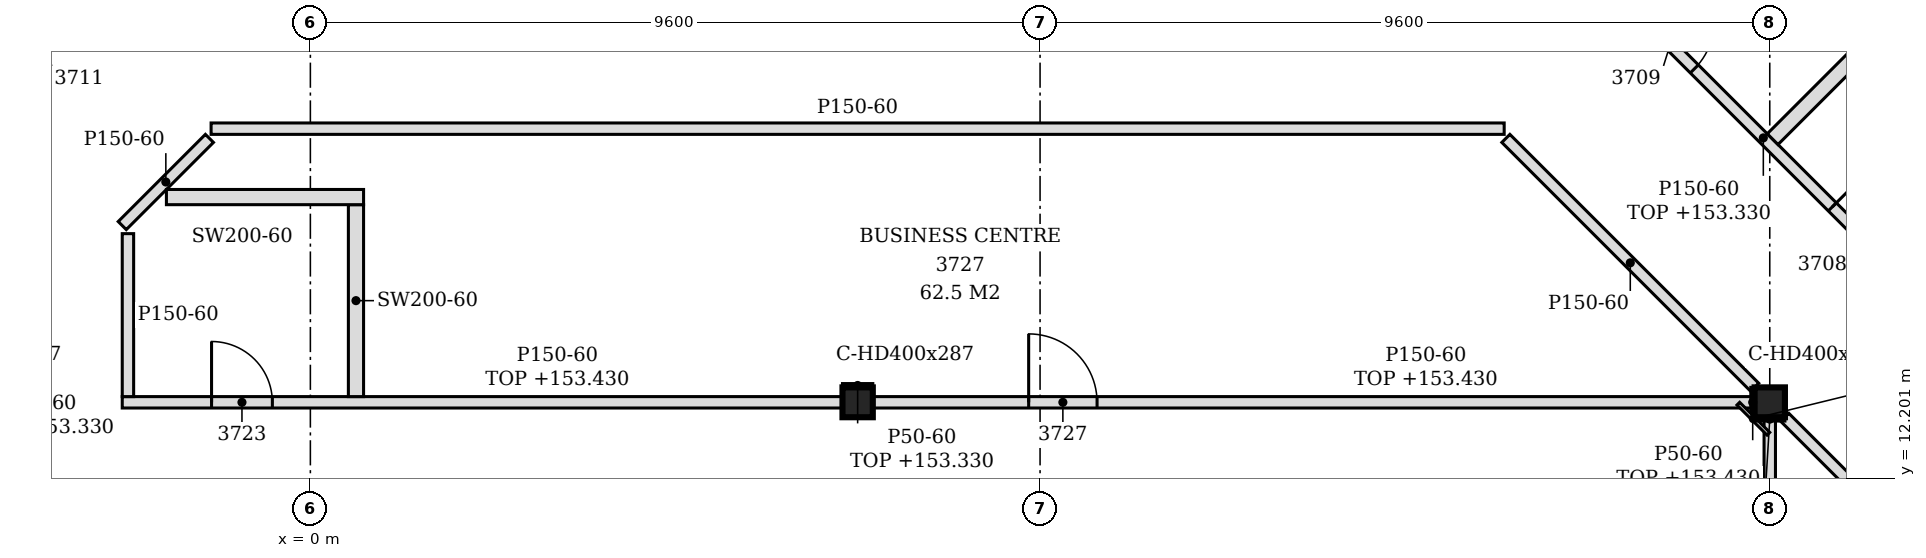
"""IFC4 building model, lengths in metres.
Left out: names, types, materials, properties, quantities, classifications, styles, units other than length and angle.
Written with IfcOpenShell. Run it as: python <this file> out.ifc"""

import sys

from ifc_helpers import new_model, si_unit, direction, frame, frame_2d, origin, origin_2d, place, context, subcontext, project, spatial, polyline, rectangle, i_section, outline, extrude, element, fill, save


model = new_model("IFC4")
c1 = context("Model", 3, precision=1e-05, world=origin(), true_north=direction((0.0, 1.0)))
c2 = subcontext(c1, "Body", "Model", "MODEL_VIEW")
j1 = project(units=[si_unit("LENGTHUNIT", "METRE"), si_unit("PLANEANGLEUNIT", "RADIAN")], contexts=[c1])
p1 = place(None, origin())
s1 = spatial("IfcSite", under=j1, at=p1, CompositionType="ELEMENT")
p2 = place(p1, origin())
s2 = spatial("IfcBuilding", under=s1, at=p2, CompositionType="ELEMENT")
p3 = place(p2, frame((0.0, 0.0, 150.6)))
s3 = spatial("IfcBuildingStorey", under=s2, at=p3, CompositionType="ELEMENT", Elevation=150.6)
for number, where, z_axis, x_axis in (
    (1, (7.2, 13.2, -0.15), (0.0, 0.0, 1.0), (1.0, 0.0, 0.0)),
    (2, (19.2, 13.2, -0.15), (0.0, 0.0, 1.0), (1.0, 0.0, 0.0)),
):
    element("IfcColumn", number, at=place(p3, frame(where, z_axis=z_axis, x_axis=x_axis)), inside=s3, PredefinedType="COLUMN", context=c2, shape_type="SweptSolid", body=[
        extrude(i_section(OverallWidth=0.399, OverallDepth=0.393, WebThickness=0.023, FlangeThickness=0.037, FilletRadius=0.015, at=origin_2d()), origin(), (0.0, 0.0, 1.0), 3.6),
    ])
p4 = place(p3, frame((19.2, 2.596, 0.0), z_axis=(0.0, 0.0, 1.0), x_axis=(0.0, 1.0, 0.0)))
e3 = element("IfcWall", 3, at=p4, inside=s3, PredefinedType="PARTITIONING", context=c2, shape_type="SweptSolid", body=[
    extrude(rectangle(XDim=10.407, YDim=0.15, at=frame_2d((5.204, 0.0))), origin(), (0.0, 0.0, 1.0), 2.83),
])
p5 = place(p4, frame((2.954, 0.0, 0.0)))
e4 = element("IfcOpeningElement", 4, at=p5, cuts=e3, PredefinedType="OPENING", context=c2, shape_type="SweptSolid", body=[
    extrude(rectangle(XDim=0.9, YDim=2.1, at=frame_2d((0.45, 1.05))), frame((0.0, 0.085, 0.0), z_axis=(0.0, -1.0, 0.0), x_axis=(1.0, 0.0, 0.0)), (0.0, 0.0, 1.0), 0.17),
])
p6 = place(p3, frame((23.872, 8.528, 0.0), z_axis=(0.0, 0.0, 1.0), x_axis=(-0.707126073897, 0.70708748795, 0.0)))
e5 = element("IfcWall", 5, at=p6, inside=s3, PredefinedType="PARTITIONING", context=c2, shape_type="SweptSolid", body=[
    extrude(rectangle(XDim=6.327, YDim=0.15, at=frame_2d((3.164, 0.0))), origin(), (0.0, 0.0, 1.0), 2.88),
])
p7 = place(p3, frame((-12.075, 9.319, 0.0), z_axis=(0.0, 0.0, 1.0), x_axis=(0.707106781187, 0.707106781187, 0.0)))
e6 = element("IfcWall", 6, at=p7, inside=s3, PredefinedType="PARTITIONING", context=c2, shape_type="SweptSolid", body=[
    extrude(rectangle(XDim=13.793, YDim=0.15, at=frame_2d((6.896, 0.0))), origin(), (0.0, 0.0, 1.0), 2.73),
])
p8 = place(p7, frame((11.692, 0.0, 0.0)))
e7 = element("IfcOpeningElement", 7, at=p8, cuts=e6, PredefinedType="OPENING", context=c2, shape_type="SweptSolid", body=[
    extrude(rectangle(XDim=0.9, YDim=2.1, at=frame_2d((0.45, 1.05))), frame((0.0, 0.085, 0.0), z_axis=(0.0, -1.0, 0.0), x_axis=(1.0, 0.0, 0.0)), (0.0, 0.0, 1.0), 0.17),
])
p9 = place(p7, frame((7.376, 0.0, 0.0)))
e8 = element("IfcOpeningElement", 8, at=p9, cuts=e6, PredefinedType="OPENING", context=c2, shape_type="SweptSolid", body=[
    extrude(rectangle(XDim=0.9, YDim=2.1, at=frame_2d((0.45, 1.05))), frame((0.0, 0.085, 0.0), z_axis=(0.0, -1.0, 0.0), x_axis=(1.0, 0.0, 0.0)), (0.0, 0.0, 1.0), 0.17),
])
p10 = place(p7, frame((3.62, 0.0, 0.0)))
e9 = element("IfcOpeningElement", 9, at=p10, cuts=e6, PredefinedType="OPENING", context=c2, shape_type="SweptSolid", body=[
    extrude(rectangle(XDim=0.9, YDim=2.1, at=frame_2d((0.45, 1.05))), frame((0.0, 0.085, 0.0), z_axis=(0.0, -1.0, 0.0), x_axis=(1.0, 0.0, 0.0)), (0.0, 0.0, 1.0), 0.17),
])
p11 = place(p3, frame((26.272, 9.522, 0.0), z_axis=(0.0, 0.0, 1.0), x_axis=(-0.707097742657, 0.707115819601, 0.0)))
e10 = element("IfcWall", 10, at=p11, inside=s3, PredefinedType="PARTITIONING", context=c2, shape_type="SweptSolid", body=[
    extrude(rectangle(XDim=13.506, YDim=0.15, at=frame_2d((6.753, 0.0))), origin(), (0.0, 0.0, 1.0), 2.73),
])
p12 = place(p11, frame((1.398, 0.0, 0.0)))
e11 = element("IfcOpeningElement", 11, at=p12, cuts=e10, PredefinedType="OPENING", context=c2, shape_type="SweptSolid", body=[
    extrude(rectangle(XDim=0.9, YDim=2.1, at=frame_2d((0.45, 1.05))), frame((0.0, 0.085, 0.0), z_axis=(0.0, -1.0, 0.0), x_axis=(1.0, 0.0, 0.0)), (0.0, 0.0, 1.0), 0.17),
])
p13 = place(p11, frame((4.668, 0.0, 0.0)))
e12 = element("IfcOpeningElement", 12, at=p13, cuts=e10, PredefinedType="OPENING", context=c2, shape_type="SweptSolid", body=[
    extrude(rectangle(XDim=0.9, YDim=2.1, at=frame_2d((0.45, 1.05))), frame((0.0, 0.085, 0.0), z_axis=(0.0, -1.0, 0.0), x_axis=(1.0, 0.0, 0.0)), (0.0, 0.0, 1.0), 0.17),
])
p14 = place(p11, frame((7.938, 0.0, 0.0)))
e13 = element("IfcOpeningElement", 13, at=p14, cuts=e10, PredefinedType="OPENING", context=c2, shape_type="SweptSolid", body=[
    extrude(rectangle(XDim=0.9, YDim=2.1, at=frame_2d((0.45, 1.05))), frame((0.0, 0.085, 0.0), z_axis=(0.0, -1.0, 0.0), x_axis=(1.0, 0.0, 0.0)), (0.0, 0.0, 1.0), 0.17),
])
p15 = place(p11, frame((11.405, 0.0, 0.0)))
e14 = element("IfcOpeningElement", 14, at=p15, cuts=e10, PredefinedType="OPENING", context=c2, shape_type="SweptSolid", body=[
    extrude(rectangle(XDim=0.9, YDim=2.1, at=frame_2d((0.45, 1.05))), frame((0.0, 0.085, 0.0), z_axis=(0.0, -1.0, 0.0), x_axis=(1.0, 0.0, 0.0)), (0.0, 0.0, 1.0), 0.17),
])
p16 = place(p3, frame((-2.475, 13.2, 0.0), z_axis=(0.0, 0.0, 1.0), x_axis=(1.0, 0.0, 0.0)))
e15 = element("IfcWall", 15, at=p16, inside=s3, PredefinedType="PARTITIONING", context=c2, shape_type="SweptSolid", body=[
    extrude(rectangle(XDim=9.476, YDim=0.15, at=frame_2d((4.738, 0.0))), origin(), (0.0, 0.0, 1.0), 2.83),
])
p17 = place(p16, frame((1.175, 0.0, 0.0)))
e16 = element("IfcOpeningElement", 16, at=p17, cuts=e15, PredefinedType="OPENING", context=c2, shape_type="SweptSolid", body=[
    extrude(rectangle(XDim=0.8, YDim=2.1, at=frame_2d((0.4, 1.05))), frame((0.0, 0.085, 0.0), z_axis=(0.0, -1.0, 0.0), x_axis=(1.0, 0.0, 0.0)), (0.0, 0.0, 1.0), 0.17),
])
p18 = place(p3, frame((7.399, 13.2, 0.0), z_axis=(0.0, 0.0, 1.0), x_axis=(1.0, 0.0, 0.0)))
e17 = element("IfcWall", 17, at=p18, inside=s3, PredefinedType="PARTITIONING", context=c2, shape_type="SweptSolid", body=[
    extrude(rectangle(XDim=11.601, YDim=0.15, at=frame_2d((5.801, 0.0))), origin(), (0.0, 0.0, 1.0), 2.83),
])
p19 = place(p18, frame((2.051, 0.0, 0.0)))
e18 = element("IfcOpeningElement", 18, at=p19, cuts=e17, PredefinedType="OPENING", context=c2, shape_type="SweptSolid", body=[
    extrude(rectangle(XDim=0.9, YDim=2.1, at=frame_2d((0.45, 1.05))), frame((0.0, 0.085, 0.0), z_axis=(0.0, -1.0, 0.0), x_axis=(1.0, 0.0, 0.0)), (0.0, 0.0, 1.0), 0.17),
])
p20 = place(p3, frame((-2.4, 13.275, 0.0), z_axis=(0.0, 0.0, 1.0), x_axis=(0.0, 1.0, 0.0)))
e19 = element("IfcWall", 19, at=p20, inside=s3, PredefinedType="PARTITIONING", context=c2, shape_type="SweptSolid", body=[
    extrude(outline(polyline([(0.0, 0.0), (2.144, 0.0), (2.144, 3.45), (0.075, 3.45), (0.073, 2.83), (0.0, 2.83), (0.0, 0.0)])), frame((0.0, 0.075, 0.0), z_axis=(0.0, -1.0, 0.0), x_axis=(1.0, 0.0, 0.0)), (0.0, 0.0, 1.0), 0.15),
])
p21 = place(p3, frame((0.6, 13.275, 0.0), z_axis=(0.0, 0.0, 1.0), x_axis=(0.0, 1.0, 0.0)))
e20 = element("IfcWall", 20, at=p21, inside=s3, PredefinedType="PARTITIONING", context=c2, shape_type="SweptSolid", body=[
    extrude(outline(polyline([(0.0, 0.0), (2.525, 0.0), (2.525, 3.45), (0.075, 3.45), (0.073, 2.83), (0.0, 2.83), (0.0, 0.0)])), frame((0.0, 0.1, 0.0), z_axis=(0.0, -1.0, 0.0), x_axis=(1.0, 0.0, 0.0)), (0.0, 0.0, 1.0), 0.2),
])
p22 = place(p3, frame((19.002, 13.398, 0.0), z_axis=(0.0, 0.0, 1.0), x_axis=(-0.707080416772, 0.707133144618, 0.0)))
e21 = element("IfcWall", 21, at=p22, inside=s3, PredefinedType="PARTITIONING", context=c2, shape_type="SweptSolid", body=[
    extrude(rectangle(XDim=4.63, YDim=0.15, at=frame_2d((2.315, 0.0))), origin(), (0.0, 0.0, 1.0), 3.45),
])
p23 = place(p3, frame((-2.475, 15.525, 0.0), z_axis=(0.0, 0.0, 1.0), x_axis=(0.707106781187, 0.707106781187, 0.0)))
e22 = element("IfcWall", 22, at=p23, inside=s3, PredefinedType="PARTITIONING", context=c2, shape_type="SweptSolid", body=[
    extrude(rectangle(XDim=1.622, YDim=0.15, at=frame_2d((0.811, 0.0))), origin(), (0.0, 0.0, 1.0), 3.45),
])
p24 = place(p3, frame((-1.894, 15.9, 0.0), z_axis=(0.0, 0.0, 1.0), x_axis=(1.0, 0.0, 0.0)))
e23 = element("IfcWall", 23, at=p24, inside=s3, PredefinedType="PARTITIONING", context=c2, shape_type="SweptSolid", body=[
    extrude(rectangle(XDim=2.594, YDim=0.2, at=frame_2d((1.297, 0.0))), origin(), (0.0, 0.0, 1.0), 3.45),
])
p25 = place(p3, frame((19.238, 16.662, 0.0), z_axis=(0.0, 0.0, 1.0), x_axis=(0.707106781187, 0.707106781187, 0.0)))
e24 = element("IfcWall", 24, at=p25, inside=s3, PredefinedType="PARTITIONING", context=c2, shape_type="SweptSolid", body=[
    extrude(rectangle(XDim=8.929, YDim=0.2, at=frame_2d((4.464, 0.0))), origin(), (0.0, 0.0, 1.0), 2.73),
])
p26 = place(p3, frame((-1.306, 16.8, 0.0), z_axis=(0.0, 0.0, 1.0), x_axis=(1.0, 0.0, 0.0)))
e25 = element("IfcWall", 25, at=p26, inside=s3, PredefinedType="PARTITIONING", context=c2, shape_type="SweptSolid", body=[
    extrude(outline(polyline([(0.0, 0.0), (17.012, 0.0), (17.012, 3.45), (8.656, 3.45), (8.654, 2.73), (8.356, 2.73), (8.354, 3.45), (0.0, 3.45), (0.0, 0.0)])), frame((0.0, 0.075, 0.0), z_axis=(0.0, -1.0, 0.0), x_axis=(1.0, 0.0, 0.0)), (0.0, 0.0, 1.0), 0.15),
])
p27 = place(p3, frame((18.976, 13.003, 0.0), z_axis=(0.0, 0.0, 1.0), x_axis=(0.0, 1.0, 0.0)))
e26 = element("IfcWall", 26, at=p27, inside=s3, PredefinedType="PARTITIONING", context=c2, shape_type="SweptSolid", body=[
    extrude(rectangle(XDim=0.393, YDim=0.05, at=frame_2d((0.197, 0.0))), origin(), (0.0, 0.0, 1.0), 2.83),
])
p28 = place(p3, frame((19.182, 12.786, 0.0), z_axis=(0.0, 0.0, 1.0), x_axis=(-0.707106781187, 0.707106781187, 0.0)))
e27 = element("IfcWall", 27, at=p28, inside=s3, PredefinedType="PARTITIONING", context=c2, shape_type="SweptSolid", body=[
    extrude(rectangle(XDim=0.56, YDim=0.05, at=frame_2d((0.28, 0.0))), origin(), (0.0, 0.0, 1.0), 2.83),
])
p29 = place(p3, frame((7.0, 13.421, 0.0), z_axis=(0.0, 0.0, 1.0), x_axis=(1.0, 0.0, 0.0)))
e28 = element("IfcWall", 28, at=p29, inside=s3, PredefinedType="PARTITIONING", context=c2, shape_type="SweptSolid", body=[
    extrude(rectangle(XDim=0.399, YDim=0.05, at=frame_2d((0.199, 0.0))), origin(), (0.0, 0.0, 1.0), 2.73),
])
p30 = place(p3, frame((19.0, 12.979, 0.0), z_axis=(0.0, 0.0, 1.0), x_axis=(1.0, 0.0, 0.0)))
e29 = element("IfcWall", 29, at=p30, inside=s3, PredefinedType="PARTITIONING", context=c2, shape_type="SweptSolid", body=[
    extrude(rectangle(XDim=0.399, YDim=0.05, at=frame_2d((0.199, 0.0))), origin(), (0.0, 0.0, 1.0), 2.83),
])
p31 = place(p14, frame((0.9, 0.0, 0.0), z_axis=(0.0, 0.0, 1.0), x_axis=(-1.0, 0.0, 0.0)))
e30 = element("IfcDoor", 30, at=p31, inside=s3, OperationType="SINGLE_SWING_LEFT", PredefinedType="DOOR", context=c2, shape_type="SweptSolid", body=[
    extrude(rectangle(XDim=0.9, YDim=2.1, at=frame_2d((0.45, 1.05))), frame((0.0, 0.025, 0.0), z_axis=(0.0, -1.0, 0.0), x_axis=(1.0, 0.0, 0.0)), (0.0, 0.0, 1.0), 0.05),
])
fill(e13, e30)
p32 = place(p15, frame((0.9, 0.0, 0.0), z_axis=(0.0, 0.0, 1.0), x_axis=(-1.0, 0.0, 0.0)))
e31 = element("IfcDoor", 31, at=p32, inside=s3, OperationType="SINGLE_SWING_LEFT", PredefinedType="DOOR", context=c2, shape_type="SweptSolid", body=[
    extrude(rectangle(XDim=0.9, YDim=2.1, at=frame_2d((0.45, 1.05))), frame((0.0, 0.025, 0.0), z_axis=(0.0, -1.0, 0.0), x_axis=(1.0, 0.0, 0.0)), (0.0, 0.0, 1.0), 0.05),
])
fill(e14, e31)
p33 = place(p8, origin())
e32 = element("IfcDoor", 32, at=p33, inside=s3, OperationType="SINGLE_SWING_RIGHT", PredefinedType="DOOR", context=c2, shape_type="SweptSolid", body=[
    extrude(rectangle(XDim=0.9, YDim=2.1, at=frame_2d((0.45, 1.05))), frame((0.0, 0.025, 0.0), z_axis=(0.0, -1.0, 0.0), x_axis=(1.0, 0.0, 0.0)), (0.0, 0.0, 1.0), 0.05),
])
fill(e7, e32)
p34 = place(p17, origin())
e33 = element("IfcDoor", 33, at=p34, inside=s3, OperationType="SINGLE_SWING_LEFT", PredefinedType="DOOR", context=c2, shape_type="SweptSolid", body=[
    extrude(rectangle(XDim=0.8, YDim=2.1, at=frame_2d((0.4, 1.05))), frame((0.0, 0.025, 0.0), z_axis=(0.0, -1.0, 0.0), x_axis=(1.0, 0.0, 0.0)), (0.0, 0.0, 1.0), 0.05),
])
fill(e16, e33)
p35 = place(p19, origin())
e34 = element("IfcDoor", 34, at=p35, inside=s3, OperationType="SINGLE_SWING_LEFT", PredefinedType="DOOR", context=c2, shape_type="SweptSolid", body=[
    extrude(rectangle(XDim=0.9, YDim=2.1, at=frame_2d((0.45, 1.05))), frame((0.0, 0.025, 0.0), z_axis=(0.0, -1.0, 0.0), x_axis=(1.0, 0.0, 0.0)), (0.0, 0.0, 1.0), 0.05),
])
fill(e18, e34)
save(model, sys.argv[1])
